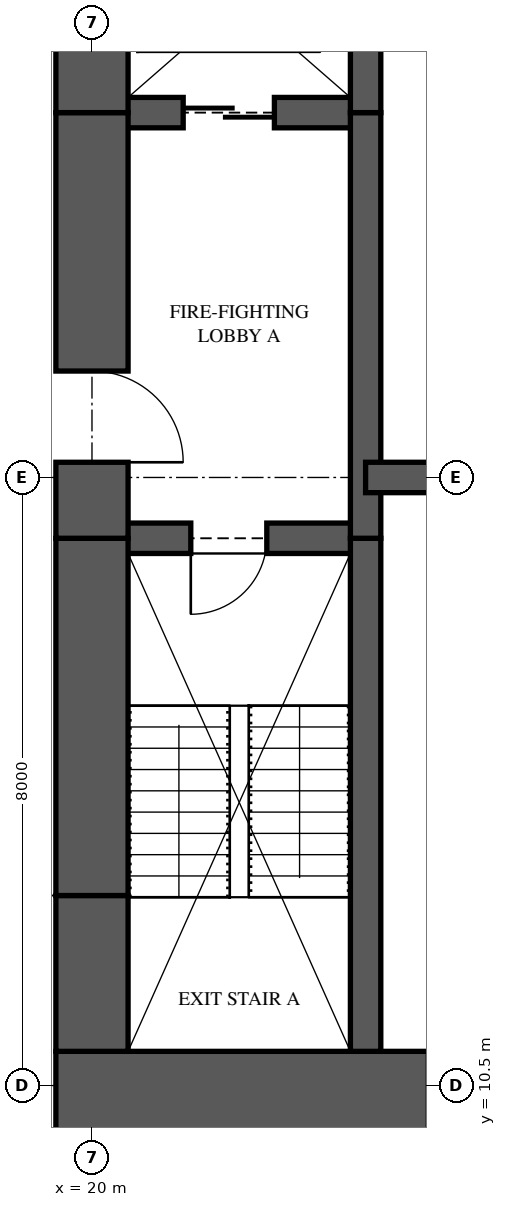
"""IFC4 building model, lengths in metres.
Left out: names, types, materials, properties, quantities, classifications, styles, units other than length and angle.
Written with IfcOpenShell. Run it as: python <this file> out.ifc"""

import sys

from ifc_helpers import new_model, si_unit, direction, frame, frame_2d, origin, place, context, subcontext, project, spatial, rectangle, extrude, element, fill, save


model = new_model("IFC4")
c1 = context("Model", 3, precision=1e-05, world=origin(), true_north=direction((0.0, 1.0)))
c2 = subcontext(c1, "Body", "Model", "MODEL_VIEW")
j1 = project(units=[si_unit("LENGTHUNIT", "METRE"), si_unit("PLANEANGLEUNIT", "RADIAN")], contexts=[c1])
p1 = place(None, origin())
s1 = spatial("IfcSite", under=j1, at=p1, CompositionType="ELEMENT")
p2 = place(p1, origin())
s2 = spatial("IfcBuilding", under=s1, at=p2, CompositionType="ELEMENT")
p3 = place(p2, frame((0.0, 0.0, 61.2)))
s3 = spatial("IfcBuildingStorey", under=s2, at=p3, CompositionType="ELEMENT", Elevation=61.2)
p4 = place(p3, frame((19.525, 10.125, 0.0), z_axis=(0.0, 0.0, 1.0), x_axis=(1.0, 0.0, 0.0)))
e1 = element("IfcWall", 1, at=p4, inside=s3, PredefinedType="SHEAR", context=c2, shape_type="SweptSolid", body=[
    extrude(rectangle(XDim=6.475, YDim=1.65, at=frame_2d((3.238, 0.0))), origin(), (0.0, 0.0, 1.0), 3.35),
])
p5 = place(p4, frame((4.9, 0.0, 0.0)))
e2 = element("IfcOpeningElement", 2, at=p5, cuts=e1, PredefinedType="OPENING", context=c2, shape_type="SweptSolid", body=[
    extrude(rectangle(XDim=0.75, YDim=2.1, at=frame_2d((0.375, 1.05))), frame((0.0, 0.835, 0.0), z_axis=(0.0, -1.0, 0.0), x_axis=(1.0, 0.0, 0.0)), (0.0, 0.0, 1.0), 1.67),
])
p6 = place(p3, frame((20.0, 26.05, 0.0), z_axis=(0.0, 0.0, 1.0), x_axis=(0.0, -1.0, 0.0)))
e3 = element("IfcWall", 3, at=p6, inside=s3, PredefinedType="SHEAR", context=c2, shape_type="SweptSolid", body=[
    extrude(rectangle(XDim=2.75, YDim=0.95, at=frame_2d((1.375, 0.0))), origin(), (0.0, 0.0, 1.0), 3.35),
])
p7 = place(p3, frame((20.0, 23.3, 0.0), z_axis=(0.0, 0.0, 1.0), x_axis=(0.0, -1.0, 0.0)))
e4 = element("IfcWall", 4, at=p7, inside=s3, PredefinedType="SHEAR", context=c2, shape_type="SweptSolid", body=[
    extrude(rectangle(XDim=5.6, YDim=0.95, at=frame_2d((2.8, 0.0))), origin(), (0.0, 0.0, 1.0), 3.35),
])
p8 = place(p7, frame((3.4, 0.0, 0.0)))
e5 = element("IfcOpeningElement", 5, at=p8, cuts=e4, PredefinedType="OPENING", context=c2, shape_type="SweptSolid", body=[
    extrude(rectangle(XDim=1.2, YDim=2.2, at=frame_2d((0.6, 1.1))), frame((0.0, 0.485, 0.0), z_axis=(0.0, -1.0, 0.0), x_axis=(1.0, 0.0, 0.0)), (0.0, 0.0, 1.0), 0.97),
])
p9 = place(p3, frame((20.0, 17.7, 0.0), z_axis=(0.0, 0.0, 1.0), x_axis=(0.0, -1.0, 0.0)))
e6 = element("IfcWall", 6, at=p9, inside=s3, PredefinedType="SHEAR", context=c2, shape_type="SweptSolid", body=[
    extrude(rectangle(XDim=4.7, YDim=0.95, at=frame_2d((2.35, 0.0))), origin(), (0.0, 0.0, 1.0), 3.35),
])
p10 = place(p3, frame((20.0, 13.0, 0.0), z_axis=(0.0, 0.0, 1.0), x_axis=(0.0, -1.0, 0.0)))
e7 = element("IfcWall", 7, at=p10, inside=s3, PredefinedType="SHEAR", context=c2, shape_type="SweptSolid", body=[
    extrude(rectangle(XDim=2.05, YDim=0.95, at=frame_2d((1.025, 0.0))), origin(), (0.0, 0.0, 1.0), 3.35),
])
p11 = place(p3, frame((23.6, 10.95, 0.0), z_axis=(0.0, 0.0, 1.0), x_axis=(0.0, 1.0, 0.0)))
e8 = element("IfcWall", 8, at=p11, inside=s3, PredefinedType="SHEAR", context=c2, shape_type="SweptSolid", body=[
    extrude(rectangle(XDim=6.75, YDim=0.4, at=frame_2d((3.375, 0.0))), origin(), (0.0, 0.0, 1.0), 3.35),
])
p12 = place(p3, frame((23.6, 17.7, 0.0), z_axis=(0.0, 0.0, 1.0), x_axis=(0.0, 1.0, 0.0)))
e9 = element("IfcWall", 9, at=p12, inside=s3, PredefinedType="SHEAR", context=c2, shape_type="SweptSolid", body=[
    extrude(rectangle(XDim=5.6, YDim=0.4, at=frame_2d((2.8, 0.0))), origin(), (0.0, 0.0, 1.0), 3.35),
])
p13 = place(p3, frame((23.6, 23.3, 0.0), z_axis=(0.0, 0.0, 1.0), x_axis=(0.0, 1.0, 0.0)))
e10 = element("IfcWall", 10, at=p13, inside=s3, PredefinedType="SHEAR", context=c2, shape_type="SweptSolid", body=[
    extrude(rectangle(XDim=2.75, YDim=0.4, at=frame_2d((1.375, 0.0))), origin(), (0.0, 0.0, 1.0), 3.35),
])
p14 = place(p3, frame((20.0, 17.7, 0.0), z_axis=(0.0, 0.0, 1.0), x_axis=(1.0, 0.0, 0.0)))
e11 = element("IfcWall", 11, at=p14, inside=s3, PredefinedType="SHEAR", context=c2, shape_type="SweptSolid", body=[
    extrude(rectangle(XDim=3.6, YDim=0.4, at=frame_2d((1.8, 0.0))), origin(), (0.0, 0.0, 1.0), 3.35),
])
p15 = place(p14, frame((1.3, 0.0, 0.0)))
e12 = element("IfcOpeningElement", 12, at=p15, cuts=e11, PredefinedType="OPENING", context=c2, shape_type="SweptSolid", body=[
    extrude(rectangle(XDim=1.0, YDim=2.1, at=frame_2d((0.5, 1.05))), frame((0.0, 0.21, 0.0), z_axis=(0.0, -1.0, 0.0), x_axis=(1.0, 0.0, 0.0)), (0.0, 0.0, 1.0), 0.42),
])
p16 = place(p3, frame((20.0, 23.3, 0.0), z_axis=(0.0, 0.0, 1.0), x_axis=(1.0, 0.0, 0.0)))
e13 = element("IfcWall", 13, at=p16, inside=s3, PredefinedType="SHEAR", context=c2, shape_type="SweptSolid", body=[
    extrude(rectangle(XDim=3.6, YDim=0.4, at=frame_2d((1.8, 0.0))), origin(), (0.0, 0.0, 1.0), 3.35),
])
p17 = place(p16, frame((1.2, 0.0, 0.0)))
e14 = element("IfcOpeningElement", 14, at=p17, cuts=e13, PredefinedType="OPENING", context=c2, shape_type="SweptSolid", body=[
    extrude(rectangle(XDim=1.2, YDim=2.1, at=frame_2d((0.6, 1.05))), frame((0.0, 0.21, 0.0), z_axis=(0.0, -1.0, 0.0), x_axis=(1.0, 0.0, 0.0)), (0.0, 0.0, 1.0), 0.42),
])
p18 = place(p3, frame((23.6, 18.5, 0.0), z_axis=(0.0, 0.0, 1.0), x_axis=(1.0, 0.0, 0.0)))
e15 = element("IfcWall", 15, at=p18, inside=s3, PredefinedType="SHEAR", context=c2, shape_type="SweptSolid", body=[
    extrude(rectangle(XDim=2.4, YDim=0.4, at=frame_2d((1.2, 0.0))), origin(), (0.0, 0.0, 1.0), 3.35),
])
p19 = place(p15, frame((1.0, 0.0, 0.0), z_axis=(0.0, 0.0, 1.0), x_axis=(-1.0, 0.0, 0.0)))
e16 = element("IfcDoor", 16, at=p19, inside=s3, OperationType="SINGLE_SWING_RIGHT", PredefinedType="DOOR", context=c2, shape_type="SweptSolid", body=[
    extrude(rectangle(XDim=1.0, YDim=2.1, at=frame_2d((0.5, 1.05))), frame((0.0, 0.025, 0.0), z_axis=(0.0, -1.0, 0.0), x_axis=(1.0, 0.0, 0.0)), (0.0, 0.0, 1.0), 0.05),
])
fill(e12, e16)
p20 = place(p8, origin())
e17 = element("IfcDoor", 17, at=p20, inside=s3, OperationType="SINGLE_SWING_RIGHT", PredefinedType="DOOR", context=c2, shape_type="SweptSolid", body=[
    extrude(rectangle(XDim=1.2, YDim=2.2, at=frame_2d((0.6, 1.1))), frame((0.0, 0.025, 0.0), z_axis=(0.0, -1.0, 0.0), x_axis=(1.0, 0.0, 0.0)), (0.0, 0.0, 1.0), 0.05),
])
fill(e5, e17)
p21 = place(p17, origin())
e18 = element("IfcDoor", 18, at=p21, inside=s3, OperationType="SLIDING_TO_LEFT", PredefinedType="DOOR", context=c2, shape_type="SweptSolid", body=[
    extrude(rectangle(XDim=1.2, YDim=2.1, at=frame_2d((0.6, 1.05))), frame((0.0, 0.025, 0.0), z_axis=(0.0, -1.0, 0.0), x_axis=(1.0, 0.0, 0.0)), (0.0, 0.0, 1.0), 0.05),
])
fill(e14, e18)
save(model, sys.argv[1])
